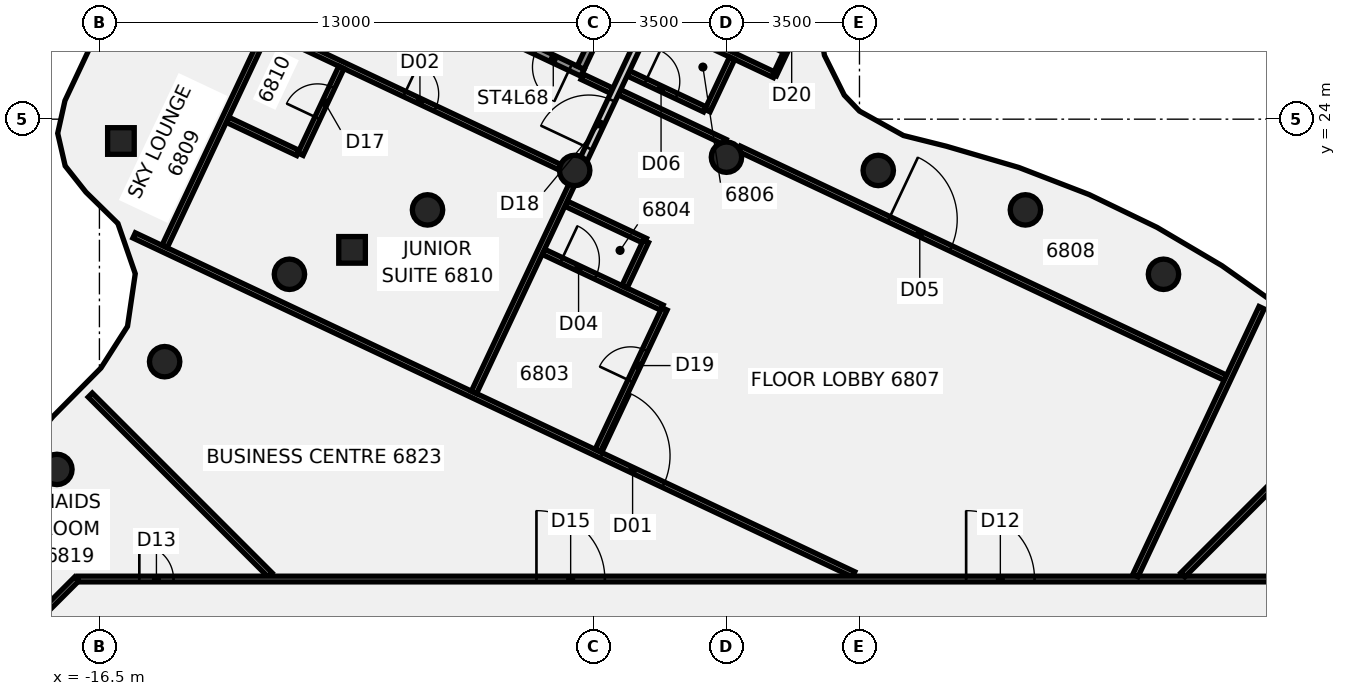
"""IFC4 building model, lengths in metres.
Left out: names, types, materials, properties, quantities, classifications, styles, units other than length and angle.
Written with IfcOpenShell. Run it as: python <this file> out.ifc"""

import sys

from ifc_helpers import new_model, si_unit, direction, frame, frame_2d, origin, origin_2d, place, context, subcontext, project, spatial, rectangle, circle, extrude, element, fill, save


model = new_model("IFC4")
c1 = context("Model", 3, precision=1e-05, world=origin(), true_north=direction((0.0, 1.0)))
c2 = subcontext(c1, "Body", "Model", "MODEL_VIEW")
j1 = project(units=[si_unit("LENGTHUNIT", "METRE"), si_unit("PLANEANGLEUNIT", "RADIAN")], contexts=[c1])
p1 = place(None, origin())
s1 = spatial("IfcSite", under=j1, at=p1, CompositionType="ELEMENT")
p2 = place(p1, origin())
s2 = spatial("IfcBuilding", under=s1, at=p2, CompositionType="ELEMENT")
p3 = place(p2, frame((0.0, 0.0, 267.6)))
s3 = spatial("IfcBuildingStorey", under=s2, at=p3, CompositionType="ELEMENT", Elevation=267.6)
for number, where, z_axis, x_axis in (
    (1, (11.5, 19.919, -0.14), (0.0, 0.0, 1.0), (1.0, 0.0, 0.0)),
    (2, (7.866, 21.613, -0.14), (0.0, 0.0, 1.0), (1.0, 0.0, 0.0)),
    (3, (3.994, 22.651, -0.14), (0.0, 0.0, 1.0), (1.0, 0.0, 0.0)),
    (4, (0.0, 23.0, -0.14), (0.0, 0.0, 1.0), (1.0, 0.0, 0.0)),
    (5, (-3.994, 22.651, -0.14), (0.0, 0.0, 1.0), (1.0, 0.0, 0.0)),
    (6, (-7.866, 21.613, -0.14), (0.0, 0.0, 1.0), (1.0, 0.0, 0.0)),
    (7, (-11.5, 19.919, -0.14), (0.0, 0.0, 1.0), (1.0, 0.0, 0.0)),
    (8, (-14.784, 17.619, -0.14), (0.0, 0.0, 1.0), (1.0, 0.0, 0.0)),
    (9, (-17.619, 14.784, -0.14), (0.0, 0.0, 1.0), (1.0, 0.0, 0.0)),
):
    element("IfcColumn", number, at=place(p3, frame(where, z_axis=z_axis, x_axis=x_axis)), inside=s3, PredefinedType="COLUMN", context=c2, shape_type="SweptSolid", body=[
        extrude(circle(Radius=0.4, at=origin_2d()), origin(), (0.0, 0.0, 1.0), 3.6),
    ])
p4 = place(p3, frame((-9.852, 20.561, -0.139), z_axis=(0.007726320639, -0.049814435702, 0.99872860476), x_axis=(0.426515930997, 0.903515234105, 0.041765803538)))
e10 = element("IfcColumn", 10, at=p4, inside=s3, PredefinedType="COLUMN", context=c2, shape_type="SweptSolid", body=[
    extrude(rectangle(XDim=0.7, YDim=0.7, at=origin_2d()), origin(), (0.0, 0.0, 1.0), 3.602),
])
p5 = place(p3, frame((-15.934, 23.426, -0.138), z_axis=(0.091455260238, -0.12372964041, 0.988092562192), x_axis=(0.42939068135, 0.900165614279, 0.072976089505)))
e11 = element("IfcColumn", 11, at=p5, inside=s3, PredefinedType="COLUMN", context=c2, shape_type="SweptSolid", body=[
    extrude(rectangle(XDim=0.7, YDim=0.7, at=origin_2d()), origin(), (0.0, 0.0, 1.0), 3.638),
])
p6 = place(p3, frame((-16.741, 16.741, 0.0), z_axis=(0.0, 0.0, 1.0), x_axis=(0.707106781187, -0.707106781187, 0.0)))
e12 = element("IfcWall", 12, at=p6, inside=s3, PredefinedType="PARTITIONING", context=c2, shape_type="SweptSolid", body=[
    extrude(rectangle(XDim=6.691, YDim=0.15, at=frame_2d((3.346, 0.0))), origin(), (0.0, 0.0, 1.0), 2.864),
])
p7 = place(p3, frame((-15.587, 20.942, 0.0), z_axis=(0.0, 0.0, 1.0), x_axis=(0.904653653251, -0.426147589058, 0.0)))
e13 = element("IfcWall", 13, at=p7, inside=s3, PredefinedType="PARTITIONING", context=c2, shape_type="SweptSolid", body=[
    extrude(rectangle(XDim=20.927, YDim=0.15, at=frame_2d((10.463, 0.0))), origin(), (0.0, 0.0, 1.0), 2.864),
])
p8 = place(p7, frame((13.599, 0.0, 0.0)))
e14 = element("IfcOpeningElement", 14, at=p8, cuts=e13, PredefinedType="OPENING", context=c2, shape_type="SweptSolid", body=[
    extrude(rectangle(XDim=1.8, YDim=2.1, at=frame_2d((0.9, 1.05))), frame((0.0, 0.085, 0.0), z_axis=(0.0, -1.0, 0.0), x_axis=(1.0, 0.0, 0.0)), (0.0, 0.0, 1.0), 0.17),
])
p9 = place(p3, frame((-13.131, 23.985, 0.0), z_axis=(0.0, 0.0, 1.0), x_axis=(0.90454861014, -0.426370510112, 0.0)))
e15 = element("IfcWall", 15, at=p9, inside=s3, PredefinedType="PARTITIONING", context=c2, shape_type="SweptSolid", body=[
    extrude(rectangle(XDim=2.05, YDim=0.15, at=frame_2d((1.025, 0.0))), origin(), (0.0, 0.0, 1.0), 2.864),
])
p10 = place(p3, frame((-12.023, 26.337, 0.0), z_axis=(0.0, 0.0, 1.0), x_axis=(0.904561149332, -0.426343907098, 0.0)))
e16 = element("IfcWall", 16, at=p10, inside=s3, PredefinedType="PARTITIONING", context=c2, shape_type="SweptSolid", body=[
    extrude(rectangle(XDim=8.448, YDim=0.15, at=frame_2d((4.224, 0.0))), origin(), (0.0, 0.0, 1.0), 2.864),
])
p11 = place(p10, frame((3.925, 0.0, 0.0)))
e17 = element("IfcOpeningElement", 17, at=p11, cuts=e16, PredefinedType="OPENING", context=c2, shape_type="SweptSolid", body=[
    extrude(rectangle(XDim=0.9, YDim=2.1, at=frame_2d((0.45, 1.05))), frame((0.0, 0.085, 0.0), z_axis=(0.0, -1.0, 0.0), x_axis=(1.0, 0.0, 0.0)), (0.0, 0.0, 1.0), 0.17),
])
p12 = place(p3, frame((-3.795, 25.115, 0.0), z_axis=(0.0, 0.0, 1.0), x_axis=(0.904676452244, -0.426099186523, 0.0)))
e18 = element("IfcWall", 18, at=p12, inside=s3, PredefinedType="PARTITIONING", context=c2, shape_type="SweptSolid", body=[
    extrude(rectangle(XDim=0.856, YDim=0.15, at=frame_2d((0.428, 0.0))), origin(), (0.0, 0.0, 1.0), 2.864),
])
p13 = place(p3, frame((-4.819, 20.511, 0.0), z_axis=(0.0, 0.0, 1.0), x_axis=(0.904682334581, -0.426086697161, 0.0)))
e19 = element("IfcWall", 19, at=p13, inside=s3, PredefinedType="PARTITIONING", context=c2, shape_type="SweptSolid", body=[
    extrude(rectangle(XDim=3.45, YDim=0.15, at=frame_2d((1.725, 0.0))), origin(), (0.0, 0.0, 1.0), 2.864),
])
p14 = place(p13, frame((0.525, 0.0, 0.0)))
e20 = element("IfcOpeningElement", 20, at=p14, cuts=e19, PredefinedType="OPENING", context=c2, shape_type="SweptSolid", body=[
    extrude(rectangle(XDim=1.0, YDim=2.1, at=frame_2d((0.5, 1.05))), frame((0.0, 0.085, 0.0), z_axis=(0.0, -1.0, 0.0), x_axis=(1.0, 0.0, 0.0)), (0.0, 0.0, 1.0), 0.17),
])
p15 = place(p3, frame((-4.222, 21.778, 0.0), z_axis=(0.0, 0.0, 1.0), x_axis=(0.904566493382, -0.426332568602, 0.0)))
e21 = element("IfcWall", 21, at=p15, inside=s3, PredefinedType="PARTITIONING", context=c2, shape_type="SweptSolid", body=[
    extrude(rectangle(XDim=2.305, YDim=0.15, at=frame_2d((1.152, 0.0))), origin(), (0.0, 0.0, 1.0), 2.864),
])
p16 = place(p3, frame((-2.814, 24.708, 0.0), z_axis=(0.0, 0.0, 1.0), x_axis=(0.904636518546, -0.42618396182, 0.0)))
e22 = element("IfcWall", 22, at=p16, inside=s3, PredefinedType="PARTITIONING", context=c2, shape_type="SweptSolid", body=[
    extrude(rectangle(XDim=3.069, YDim=0.15, at=frame_2d((1.534, 0.0))), origin(), (0.0, 0.0, 1.0), 2.864),
])
p17 = place(p3, frame((0.337, 23.223, 0.0), z_axis=(0.0, 0.0, 1.0), x_axis=(0.904661349285, -0.426131251036, 0.0)))
e23 = element("IfcWall", 23, at=p17, inside=s3, PredefinedType="PARTITIONING", context=c2, shape_type="SweptSolid", body=[
    extrude(rectangle(XDim=14.141, YDim=0.15, at=frame_2d((7.07, 0.0))), origin(), (0.0, 0.0, 1.0), 2.864),
])
p18 = place(p17, frame((4.35, 0.0, 0.0)))
e24 = element("IfcOpeningElement", 24, at=p18, cuts=e23, PredefinedType="OPENING", context=c2, shape_type="SweptSolid", body=[
    extrude(rectangle(XDim=1.8, YDim=2.1, at=frame_2d((0.9, 1.05))), frame((0.0, 0.085, 0.0), z_axis=(0.0, -1.0, 0.0), x_axis=(1.0, 0.0, 0.0)), (0.0, 0.0, 1.0), 0.17),
])
p19 = place(p3, frame((-2.581, 25.205, 0.0), z_axis=(0.0, 0.0, 1.0), x_axis=(0.904689116071, -0.426072298164, 0.0)))
e25 = element("IfcWall", 25, at=p19, inside=s3, PredefinedType="PARTITIONING", context=c2, shape_type="SweptSolid", body=[
    extrude(rectangle(XDim=2.221, YDim=0.15, at=frame_2d((1.11, 0.0))), origin(), (0.0, 0.0, 1.0), 2.864),
])
p20 = place(p19, frame((0.5, 0.0, 0.0)))
e26 = element("IfcOpeningElement", 26, at=p20, cuts=e25, PredefinedType="OPENING", context=c2, shape_type="SweptSolid", body=[
    extrude(rectangle(XDim=0.9, YDim=2.1, at=frame_2d((0.45, 1.05))), frame((0.0, 0.085, 0.0), z_axis=(0.0, -1.0, 0.0), x_axis=(1.0, 0.0, 0.0)), (0.0, 0.0, 1.0), 0.17),
])
p21 = place(p3, frame((-1.898, 26.652, 0.0), z_axis=(0.0, 0.0, 1.0), x_axis=(0.904592510731, -0.426277362205, 0.0)))
e27 = element("IfcWall", 27, at=p21, inside=s3, PredefinedType="PARTITIONING", context=c2, shape_type="SweptSolid", body=[
    extrude(rectangle(XDim=3.5, YDim=0.15, at=frame_2d((1.75, 0.0))), origin(), (0.0, 0.0, 1.0), 2.864),
])
p22 = place(p3, frame((-17.065, 11.9, 0.0), z_axis=(0.0, 0.0, 1.0), x_axis=(1.0, 0.0, 0.0)))
e28 = element("IfcWall", 28, at=p22, inside=s3, PredefinedType="PARTITIONING", context=c2, shape_type="SweptSolid", body=[
    extrude(rectangle(XDim=34.165, YDim=0.15, at=frame_2d((17.083, 0.0))), origin(), (0.0, 0.0, 1.0), 2.864),
])
p23 = place(p22, frame((23.372, 0.0, 0.0)))
e29 = element("IfcOpeningElement", 29, at=p23, cuts=e28, PredefinedType="OPENING", context=c2, shape_type="SweptSolid", body=[
    extrude(rectangle(XDim=1.8, YDim=2.1, at=frame_2d((0.9, 1.05))), frame((0.0, 0.085, 0.0), z_axis=(0.0, -1.0, 0.0), x_axis=(1.0, 0.0, 0.0)), (0.0, 0.0, 1.0), 0.17),
])
p24 = place(p22, frame((1.615, 0.0, 0.0)))
e30 = element("IfcOpeningElement", 30, at=p24, cuts=e28, PredefinedType="OPENING", context=c2, shape_type="SweptSolid", body=[
    extrude(rectangle(XDim=0.9, YDim=2.1, at=frame_2d((0.45, 1.05))), frame((0.0, 0.085, 0.0), z_axis=(0.0, -1.0, 0.0), x_axis=(1.0, 0.0, 0.0)), (0.0, 0.0, 1.0), 0.17),
])
p25 = place(p22, frame((31.665, 0.0, 0.0)))
e31 = element("IfcOpeningElement", 31, at=p25, cuts=e28, PredefinedType="OPENING", context=c2, shape_type="SweptSolid", body=[
    extrude(rectangle(XDim=0.9, YDim=2.1, at=frame_2d((0.45, 1.05))), frame((0.0, 0.085, 0.0), z_axis=(0.0, -1.0, 0.0), x_axis=(1.0, 0.0, 0.0)), (0.0, 0.0, 1.0), 0.17),
])
p26 = place(p22, frame((12.065, 0.0, 0.0)))
e32 = element("IfcOpeningElement", 32, at=p26, cuts=e28, PredefinedType="OPENING", context=c2, shape_type="SweptSolid", body=[
    extrude(rectangle(XDim=1.8, YDim=2.1, at=frame_2d((0.9, 1.05))), frame((0.0, 0.085, 0.0), z_axis=(0.0, -1.0, 0.0), x_axis=(1.0, 0.0, 0.0)), (0.0, 0.0, 1.0), 0.17),
])
p27 = place(p3, frame((-18.886, 10.114, 0.0), z_axis=(0.0, 0.0, 1.0), x_axis=(0.707106781187, 0.707106781187, 0.0)))
e33 = element("IfcWall", 33, at=p27, inside=s3, PredefinedType="PARTITIONING", context=c2, shape_type="SweptSolid", body=[
    extrude(rectangle(XDim=2.526, YDim=0.15, at=frame_2d((1.263, 0.0))), origin(), (0.0, 0.0, 1.0), 2.864),
])
p28 = place(p3, frame((12.01, 12.01, 0.0), z_axis=(0.0, 0.0, 1.0), x_axis=(0.707106781187, 0.707106781187, 0.0)))
e34 = element("IfcWall", 34, at=p28, inside=s3, PredefinedType="PARTITIONING", context=c2, shape_type="SweptSolid", body=[
    extrude(rectangle(XDim=6.691, YDim=0.15, at=frame_2d((3.345, 0.0))), origin(), (0.0, 0.0, 1.0), 2.864),
])
p29 = place(p3, frame((-14.784, 20.651, 0.0), z_axis=(0.0, 0.0, 1.0), x_axis=(0.426039298085, 0.90470465705, 0.0)))
e35 = element("IfcWall", 35, at=p29, inside=s3, PredefinedType="PARTITIONING", context=c2, shape_type="SweptSolid", body=[
    extrude(rectangle(XDim=14.219, YDim=0.15, at=frame_2d((7.109, 0.0))), origin(), (0.0, 0.0, 1.0), 2.864),
])
p30 = place(p29, frame((6.77, 0.0, 0.0)))
e36 = element("IfcOpeningElement", 36, at=p30, cuts=e35, PredefinedType="OPENING", context=c2, shape_type="SweptSolid", body=[
    extrude(rectangle(XDim=1.8, YDim=2.1, at=frame_2d((0.9, 1.05))), frame((0.0, 0.085, 0.0), z_axis=(0.0, -1.0, 0.0), x_axis=(1.0, 0.0, 0.0)), (0.0, 0.0, 1.0), 0.17),
])
p31 = place(p3, frame((-11.209, 23.079, 0.0), z_axis=(0.0, 0.0, 1.0), x_axis=(0.426127627969, 0.904663055884, 0.0)))
e37 = element("IfcWall", 37, at=p31, inside=s3, PredefinedType="PARTITIONING", context=c2, shape_type="SweptSolid", body=[
    extrude(rectangle(XDim=2.525, YDim=0.15, at=frame_2d((1.262, 0.0))), origin(), (0.0, 0.0, 1.0), 2.864),
])
p32 = place(p31, frame((1.05, 0.0, 0.0)))
e38 = element("IfcOpeningElement", 38, at=p32, cuts=e37, PredefinedType="OPENING", context=c2, shape_type="SweptSolid", body=[
    extrude(rectangle(XDim=0.9, YDim=2.1, at=frame_2d((0.45, 1.05))), frame((0.0, 0.085, 0.0), z_axis=(0.0, -1.0, 0.0), x_axis=(1.0, 0.0, 0.0)), (0.0, 0.0, 1.0), 0.17),
])
p33 = place(p3, frame((-6.644, 16.812, 0.0), z_axis=(0.0, 0.0, 1.0), x_axis=(0.426051642649, 0.904698843702, 0.0)))
e39 = element("IfcWall", 39, at=p33, inside=s3, PredefinedType="PARTITIONING", context=c2, shape_type="SweptSolid", body=[
    extrude(rectangle(XDim=6.188, YDim=0.15, at=frame_2d((3.094, 0.0))), origin(), (0.0, 0.0, 1.0), 2.864),
])
p34 = place(p3, frame((-3.816, 22.817, 0.0), z_axis=(0.0, 0.0, 1.0), x_axis=(0.426029500763, 0.904709270694, 0.0)))
e40 = element("IfcWall", 40, at=p34, inside=s3, PredefinedType="PARTITIONING", context=c2, shape_type="SweptSolid", body=[
    extrude(rectangle(XDim=7.586, YDim=0.2, at=frame_2d((3.793, 0.0))), origin(), (0.0, 0.0, 1.0), 2.864),
])
p35 = place(p34, frame((0.462, 0.0, 0.0)))
e41 = element("IfcOpeningElement", 41, at=p35, cuts=e40, PredefinedType="OPENING", context=c2, shape_type="SweptSolid", body=[
    extrude(rectangle(XDim=1.4, YDim=2.1, at=frame_2d((0.7, 1.05))), frame((0.0, 0.11, 0.0), z_axis=(0.0, -1.0, 0.0), x_axis=(1.0, 0.0, 0.0)), (0.0, 0.0, 1.0), 0.22),
])
p36 = place(p3, frame((-3.386, 15.282, 0.0), z_axis=(0.0, 0.0, 1.0), x_axis=(0.426279306761, 0.904591594383, 0.0)))
e42 = element("IfcWall", 42, at=p36, inside=s3, PredefinedType="PARTITIONING", context=c2, shape_type="SweptSolid", body=[
    extrude(rectangle(XDim=4.12, YDim=0.15, at=frame_2d((2.06, 0.0))), origin(), (0.0, 0.0, 1.0), 2.864),
])
p37 = place(p36, frame((2.02, 0.0, 0.0)))
e43 = element("IfcOpeningElement", 43, at=p37, cuts=e42, PredefinedType="OPENING", context=c2, shape_type="SweptSolid", body=[
    extrude(rectangle(XDim=0.9, YDim=2.1, at=frame_2d((0.45, 1.05))), frame((0.0, 0.085, 0.0), z_axis=(0.0, -1.0, 0.0), x_axis=(1.0, 0.0, 0.0)), (0.0, 0.0, 1.0), 0.17),
])
p38 = place(p3, frame((1.269, 25.161, 0.0), z_axis=(0.0, 0.0, 1.0), x_axis=(0.426264406973, 0.904598615601, 0.0)))
e44 = element("IfcWall", 44, at=p38, inside=s3, PredefinedType="PARTITIONING", context=c2, shape_type="SweptSolid", body=[
    extrude(rectangle(XDim=2.138, YDim=0.1, at=frame_2d((1.069, 0.0))), origin(), (0.0, 0.0, 1.0), 2.864),
])
p39 = place(p38, frame((0.6, 0.0, 0.0)))
e45 = element("IfcOpeningElement", 45, at=p39, cuts=e44, PredefinedType="OPENING", context=c2, shape_type="SweptSolid", body=[
    extrude(rectangle(XDim=0.9, YDim=2.1, at=frame_2d((0.45, 1.05))), frame((0.0, 0.06, 0.0), z_axis=(0.0, -1.0, 0.0), x_axis=(1.0, 0.0, 0.0)), (0.0, 0.0, 1.0), 0.12),
])
p40 = place(p3, frame((-2.683, 19.589, 0.0), z_axis=(0.0, 0.0, 1.0), x_axis=(0.426001205364, 0.904722594516, 0.0)))
e46 = element("IfcWall", 46, at=p40, inside=s3, PredefinedType="PARTITIONING", context=c2, shape_type="SweptSolid", body=[
    extrude(rectangle(XDim=1.324, YDim=0.15, at=frame_2d((0.662, 0.0))), origin(), (0.0, 0.0, 1.0), 2.864),
])
p41 = place(p3, frame((-0.5, 24.226, 0.0), z_axis=(0.0, 0.0, 1.0), x_axis=(0.42594360631, 0.904749713591, 0.0)))
e47 = element("IfcWall", 47, at=p41, inside=s3, PredefinedType="PARTITIONING", context=c2, shape_type="SweptSolid", body=[
    extrude(rectangle(XDim=1.524, YDim=0.15, at=frame_2d((0.762, 0.0))), origin(), (0.0, 0.0, 1.0), 2.864),
])
p42 = place(p3, frame((10.76, 11.99, 0.0), z_axis=(0.0, 0.0, 1.0), x_axis=(0.426145612642, 0.904654584262, 0.0)))
e48 = element("IfcWall", 48, at=p42, inside=s3, PredefinedType="PARTITIONING", context=c2, shape_type="SweptSolid", body=[
    extrude(rectangle(XDim=7.791, YDim=0.15, at=frame_2d((3.896, 0.0))), origin(), (0.0, 0.0, 1.0), 2.864),
])
p43 = place(p3, frame((-3.788, 25.221, -0.14), z_axis=(0.0, 0.0, 1.0), x_axis=(-0.904654301063, 0.426146213837, 0.0)))
e49 = element("IfcWall", 49, at=p43, inside=s3, PredefinedType="SHEAR", context=c2, shape_type="SweptSolid", body=[
    extrude(rectangle(XDim=6.7, YDim=0.2, at=frame_2d((3.35, 0.0))), origin(), (0.0, 0.0, 1.0), 3.154),
])
p44 = place(p43, frame((0.35, 0.0, 0.0)))
e50 = element("IfcOpeningElement", 50, at=p44, cuts=e49, PredefinedType="OPENING", context=c2, shape_type="SweptSolid", body=[
    extrude(rectangle(XDim=1.0, YDim=2.1, at=frame_2d((0.5, 1.05))), frame((0.0, 0.11, 0.0), z_axis=(0.0, -1.0, 0.0), x_axis=(1.0, 0.0, 0.0)), (0.0, 0.0, 1.0), 0.22),
])
p45 = place(p3, frame((-2.473, 28.25, -0.14), z_axis=(0.0, 0.0, 1.0), x_axis=(-0.426094619589, -0.904678603238, 0.0)))
e51 = element("IfcWall", 51, at=p45, inside=s3, PredefinedType="SHEAR", context=c2, shape_type="SweptSolid", body=[
    extrude(rectangle(XDim=3.2, YDim=0.2, at=frame_2d((1.6, 0.0))), origin(), (0.0, 0.0, 1.0), 3.6),
])
p46 = place(p8, origin())
e52 = element("IfcDoor", 52, at=p46, inside=s3, OperationType="DOUBLE_DOOR_SINGLE_SWING", PredefinedType="DOOR", context=c2, shape_type="SweptSolid", body=[
    extrude(rectangle(XDim=1.8, YDim=2.1, at=frame_2d((0.9, 1.05))), frame((0.0, 0.025, 0.0), z_axis=(0.0, -1.0, 0.0), x_axis=(1.0, 0.0, 0.0)), (0.0, 0.0, 1.0), 0.05),
])
fill(e14, e52)
p47 = place(p11, frame((0.9, 0.0, 0.0), z_axis=(0.0, 0.0, 1.0), x_axis=(-1.0, 0.0, 0.0)))
e53 = element("IfcDoor", 53, at=p47, inside=s3, OperationType="SINGLE_SWING_RIGHT", PredefinedType="DOOR", context=c2, shape_type="SweptSolid", body=[
    extrude(rectangle(XDim=0.9, YDim=2.1, at=frame_2d((0.45, 1.05))), frame((0.0, 0.025, 0.0), z_axis=(0.0, -1.0, 0.0), x_axis=(1.0, 0.0, 0.0)), (0.0, 0.0, 1.0), 0.05),
])
fill(e17, e53)
p48 = place(p14, origin())
e54 = element("IfcDoor", 54, at=p48, inside=s3, OperationType="SINGLE_SWING_RIGHT", PredefinedType="DOOR", context=c2, shape_type="SweptSolid", body=[
    extrude(rectangle(XDim=1.0, YDim=2.1, at=frame_2d((0.5, 1.05))), frame((0.0, 0.025, 0.0), z_axis=(0.0, -1.0, 0.0), x_axis=(1.0, 0.0, 0.0)), (0.0, 0.0, 1.0), 0.05),
])
fill(e20, e54)
p49 = place(p18, origin())
e55 = element("IfcDoor", 55, at=p49, inside=s3, OperationType="DOUBLE_DOOR_SINGLE_SWING", PredefinedType="DOOR", context=c2, shape_type="SweptSolid", body=[
    extrude(rectangle(XDim=1.8, YDim=2.1, at=frame_2d((0.9, 1.05))), frame((0.0, 0.025, 0.0), z_axis=(0.0, -1.0, 0.0), x_axis=(1.0, 0.0, 0.0)), (0.0, 0.0, 1.0), 0.05),
])
fill(e24, e55)
p50 = place(p20, origin())
e56 = element("IfcDoor", 56, at=p50, inside=s3, OperationType="SINGLE_SWING_RIGHT", PredefinedType="DOOR", context=c2, shape_type="SweptSolid", body=[
    extrude(rectangle(XDim=0.9, YDim=2.1, at=frame_2d((0.45, 1.05))), frame((0.0, 0.025, 0.0), z_axis=(0.0, -1.0, 0.0), x_axis=(1.0, 0.0, 0.0)), (0.0, 0.0, 1.0), 0.05),
])
fill(e26, e56)
p51 = place(p23, frame((1.8, 0.0, 0.0), z_axis=(0.0, 0.0, 1.0), x_axis=(-1.0, 0.0, 0.0)))
e57 = element("IfcDoor", 57, at=p51, inside=s3, OperationType="DOUBLE_DOOR_SINGLE_SWING", PredefinedType="DOOR", context=c2, shape_type="SweptSolid", body=[
    extrude(rectangle(XDim=1.8, YDim=2.1, at=frame_2d((0.9, 1.05))), frame((0.0, 0.025, 0.0), z_axis=(0.0, -1.0, 0.0), x_axis=(1.0, 0.0, 0.0)), (0.0, 0.0, 1.0), 0.05),
])
fill(e29, e57)
p52 = place(p24, origin())
e58 = element("IfcDoor", 58, at=p52, inside=s3, OperationType="SINGLE_SWING_RIGHT", PredefinedType="DOOR", context=c2, shape_type="SweptSolid", body=[
    extrude(rectangle(XDim=0.9, YDim=2.1, at=frame_2d((0.45, 1.05))), frame((0.0, 0.025, 0.0), z_axis=(0.0, -1.0, 0.0), x_axis=(1.0, 0.0, 0.0)), (0.0, 0.0, 1.0), 0.05),
])
fill(e30, e58)
p53 = place(p26, frame((1.8, 0.0, 0.0), z_axis=(0.0, 0.0, 1.0), x_axis=(-1.0, 0.0, 0.0)))
e59 = element("IfcDoor", 59, at=p53, inside=s3, OperationType="DOUBLE_DOOR_SINGLE_SWING", PredefinedType="DOOR", context=c2, shape_type="SweptSolid", body=[
    extrude(rectangle(XDim=1.8, YDim=2.1, at=frame_2d((0.9, 1.05))), frame((0.0, 0.025, 0.0), z_axis=(0.0, -1.0, 0.0), x_axis=(1.0, 0.0, 0.0)), (0.0, 0.0, 1.0), 0.05),
])
fill(e32, e59)
p54 = place(p32, origin())
e60 = element("IfcDoor", 60, at=p54, inside=s3, OperationType="SINGLE_SWING_LEFT", PredefinedType="DOOR", context=c2, shape_type="SweptSolid", body=[
    extrude(rectangle(XDim=0.9, YDim=2.1, at=frame_2d((0.45, 1.05))), frame((0.0, 0.025, 0.0), z_axis=(0.0, -1.0, 0.0), x_axis=(1.0, 0.0, 0.0)), (0.0, 0.0, 1.0), 0.05),
])
fill(e38, e60)
p55 = place(p35, frame((1.4, 0.0, 0.0), z_axis=(0.0, 0.0, 1.0), x_axis=(-1.0, 0.0, 0.0)))
e61 = element("IfcDoor", 61, at=p55, inside=s3, OperationType="DOUBLE_DOOR_SINGLE_SWING", PredefinedType="DOOR", context=c2, shape_type="SweptSolid", body=[
    extrude(rectangle(XDim=1.4, YDim=2.1, at=frame_2d((0.7, 1.05))), frame((0.0, 0.025, 0.0), z_axis=(0.0, -1.0, 0.0), x_axis=(1.0, 0.0, 0.0)), (0.0, 0.0, 1.0), 0.05),
])
fill(e41, e61)
p56 = place(p37, origin())
e62 = element("IfcDoor", 62, at=p56, inside=s3, OperationType="SINGLE_SWING_LEFT", PredefinedType="DOOR", context=c2, shape_type="SweptSolid", body=[
    extrude(rectangle(XDim=0.9, YDim=2.1, at=frame_2d((0.45, 1.05))), frame((0.0, 0.025, 0.0), z_axis=(0.0, -1.0, 0.0), x_axis=(1.0, 0.0, 0.0)), (0.0, 0.0, 1.0), 0.05),
])
fill(e43, e62)
p57 = place(p39, origin())
e63 = element("IfcDoor", 63, at=p57, inside=s3, OperationType="SINGLE_SWING_RIGHT", PredefinedType="DOOR", context=c2, shape_type="SweptSolid", body=[
    extrude(rectangle(XDim=0.9, YDim=2.1, at=frame_2d((0.45, 1.05))), frame((0.0, 0.025, 0.0), z_axis=(0.0, -1.0, 0.0), x_axis=(1.0, 0.0, 0.0)), (0.0, 0.0, 1.0), 0.05),
])
fill(e45, e63)
p58 = place(p44, origin())
e64 = element("IfcDoor", 64, at=p58, inside=s3, OperationType="SINGLE_SWING_LEFT", PredefinedType="DOOR", context=c2, shape_type="SweptSolid", body=[
    extrude(rectangle(XDim=1.0, YDim=2.1, at=frame_2d((0.5, 1.05))), frame((0.0, 0.025, 0.0), z_axis=(0.0, -1.0, 0.0), x_axis=(1.0, 0.0, 0.0)), (0.0, 0.0, 1.0), 0.05),
])
fill(e50, e64)
save(model, sys.argv[1])
